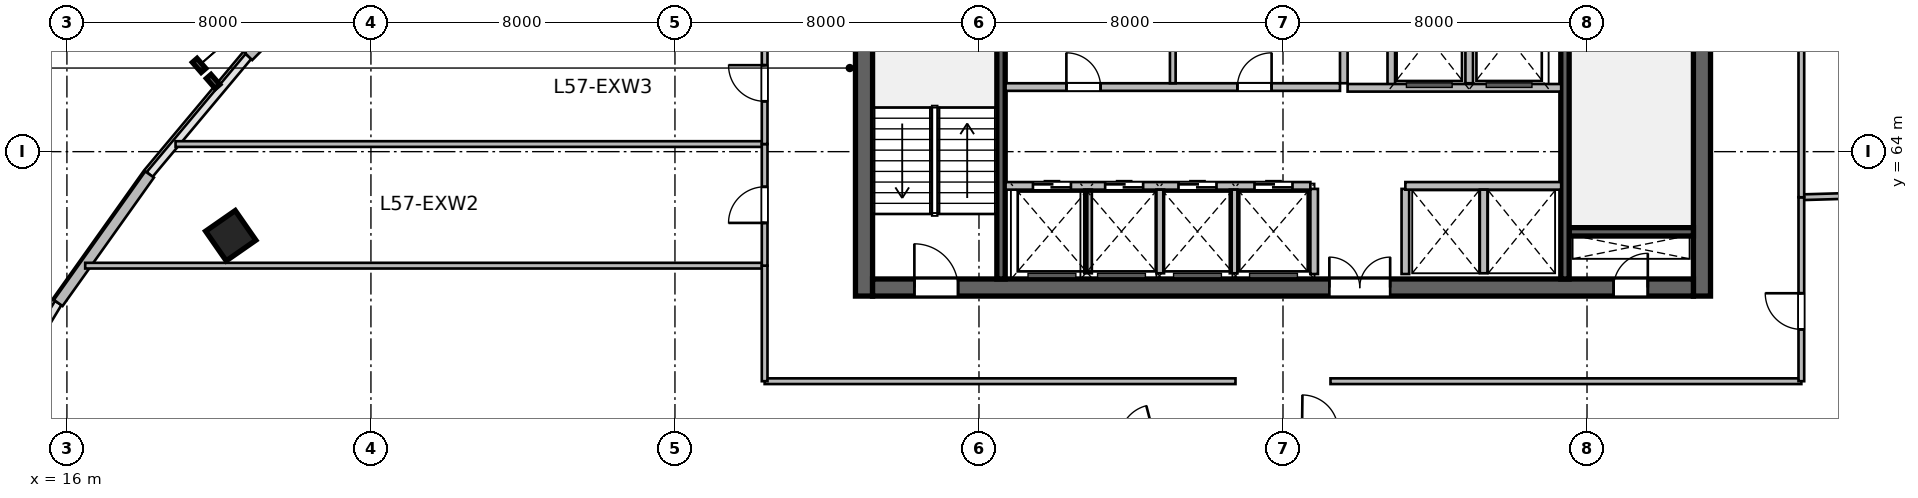
"""IFC4 building model, lengths in metres.
Left out: names, types, materials, properties, quantities, classifications, styles, units other than length and angle.
Written with IfcOpenShell. Run it as: python <this file> out.ifc"""

import sys

from ifc_helpers import new_model, si_unit, direction, frame, frame_2d, origin, origin_2d, place, context, subcontext, project, spatial, rectangle, extrude, source, transform, mapped, element, fill, save


model = new_model("IFC4")
c1 = context("Model", 3, precision=1e-05, world=origin(), true_north=direction((0.0, 1.0)))
c2 = subcontext(c1, "Body", "Model", "MODEL_VIEW")
j1 = project(units=[si_unit("LENGTHUNIT", "METRE"), si_unit("PLANEANGLEUNIT", "RADIAN")], contexts=[c1])
p1 = place(None, origin())
s1 = spatial("IfcSite", under=j1, at=p1, CompositionType="ELEMENT")
p2 = place(p1, origin())
s2 = spatial("IfcBuilding", under=s1, at=p2, CompositionType="ELEMENT")
p3 = place(p2, frame((0.0, 0.0, 235.2)))
s3 = spatial("IfcBuildingStorey", under=s2, at=p3, CompositionType="ELEMENT", Elevation=235.2)
m1 = source(origin(), c2, "Body", "SweptSolid", [
    extrude(rectangle(XDim=12.0, YDim=0.45, at=frame_2d((6.0, 0.0))), origin(), (0.0, 0.0, 1.0), 3.9),
])
for number, where, z_axis, x_axis in (
    (1, (36.975, 60.2, 0.0), (0.0, 0.0, 1.0), (0.0, 1.0, 0.0)),
    (2, (59.025, 60.2, 0.0), (0.0, 0.0, 1.0), (0.0, 1.0, 0.0)),
):
    element("IfcWall", number, at=place(p3, frame(where, z_axis=z_axis, x_axis=x_axis)), inside=s3, PredefinedType="SHEAR", context=c2, shape_type="MappedRepresentation", body=[
        mapped(m1, transform((0.0, 0.0, 0.0), scale=1.0)),
    ])
m2 = source(origin(), c2, "Body", "SweptSolid", [
    extrude(rectangle(XDim=21.6, YDim=0.45, at=frame_2d((10.8, 0.0))), origin(), (0.0, 0.0, 1.0), 3.9),
])
p4 = place(p3, frame((37.2, 60.425, 0.0), z_axis=(0.0, 0.0, 1.0), x_axis=(1.0, 0.0, 0.0)))
e3 = element("IfcWall", 3, at=p4, inside=s3, PredefinedType="SHEAR", context=c2, shape_type="MappedRepresentation", body=[
    mapped(m2, transform((0.0, 0.0, 0.0), scale=1.0)),
])
p5 = place(p4, frame((1.1, 0.0, 0.0)))
e4 = element("IfcOpeningElement", 4, at=p5, cuts=e3, PredefinedType="OPENING", context=c2, shape_type="SweptSolid", body=[
    extrude(rectangle(XDim=1.15, YDim=2.15, at=frame_2d((0.575, 1.075))), frame((0.0, 0.235, 0.0), z_axis=(0.0, -1.0, 0.0), x_axis=(1.0, 0.0, 0.0)), (0.0, 0.0, 1.0), 0.47),
])
p6 = place(p4, frame((19.5, 0.0, 0.0)))
e5 = element("IfcOpeningElement", 5, at=p6, cuts=e3, PredefinedType="OPENING", context=c2, shape_type="SweptSolid", body=[
    extrude(rectangle(XDim=0.9, YDim=2.1, at=frame_2d((0.45, 1.05))), frame((0.0, 0.235, 0.0), z_axis=(0.0, -1.0, 0.0), x_axis=(1.0, 0.0, 0.0)), (0.0, 0.0, 1.0), 0.47),
])
p7 = place(p4, frame((12.02, 0.0, 0.0)))
e6 = element("IfcOpeningElement", 6, at=p7, cuts=e3, PredefinedType="OPENING", context=c2, shape_type="SweptSolid", body=[
    extrude(rectangle(XDim=1.6, YDim=2.15, at=frame_2d((0.8, 1.075))), frame((0.0, 0.235, 0.0), z_axis=(0.0, -1.0, 0.0), x_axis=(1.0, 0.0, 0.0)), (0.0, 0.0, 1.0), 0.47),
])
m3 = source(origin(), c2, "Body", "SweptSolid", [
    extrude(rectangle(XDim=3.27, YDim=0.22, at=frame_2d((1.635, 0.0))), origin(), (0.0, 0.0, 1.0), 3.9),
])
p8 = place(p3, frame((55.53, 61.89, 0.0), z_axis=(0.0, 0.0, 1.0), x_axis=(1.0, 0.0, 0.0)))
e7 = element("IfcWall", 7, at=p8, inside=s3, PredefinedType="SHEAR", context=c2, shape_type="MappedRepresentation", body=[
    mapped(m3, transform((0.0, 0.0, 0.0), scale=1.0)),
])
m4 = source(origin(), c2, "Body", "SweptSolid", [
    extrude(rectangle(XDim=11.1, YDim=0.22, at=frame_2d((5.55, 0.0))), origin(), (0.0, 0.0, 1.0), 3.9),
])
p9 = place(p3, frame((40.58, 60.65, 0.0), z_axis=(0.0, 0.0, 1.0), x_axis=(0.0, 1.0, 0.0)))
e8 = element("IfcWall", 8, at=p9, inside=s3, PredefinedType="SHEAR", context=c2, shape_type="MappedRepresentation", body=[
    mapped(m4, transform((0.0, 0.0, 0.0), scale=1.0)),
])
p10 = place(p3, frame((55.42, 60.65, 0.0), z_axis=(0.0, 0.0, 1.0), x_axis=(0.0, 1.0, 0.0)))
e9 = element("IfcWall", 9, at=p10, inside=s3, PredefinedType="SHEAR", context=c2, shape_type="MappedRepresentation", body=[
    mapped(m4, transform((0.0, 0.0, 0.0), scale=1.0)),
])
p11 = place(p10, frame((9.595, 0.0, 0.0)))
e10 = element("IfcOpeningElement", 10, at=p11, cuts=e9, PredefinedType="OPENING", context=c2, shape_type="SweptSolid", body=[
    extrude(rectangle(XDim=1.15, YDim=2.15, at=frame_2d((0.575, 1.075))), frame((0.0, 0.12, 0.0), z_axis=(0.0, -1.0, 0.0), x_axis=(1.0, 0.0, 0.0)), (0.0, 0.0, 1.0), 0.24),
])
m5 = source(origin(), c2, "Body", "SweptSolid", [
    extrude(rectangle(XDim=0.95, YDim=0.95, at=origin_2d()), origin(), (0.0, 0.0, 1.0), 3.9),
])
p12 = place(p3, frame((20.311, 61.789, 0.0), z_axis=(0.0, 0.0, 1.0), x_axis=(-0.571143442153, 0.820850271661, 0.0)))
e11 = element("IfcColumn", 11, at=p12, inside=s3, PredefinedType="COLUMN", context=c2, shape_type="MappedRepresentation", body=[
    mapped(m5, transform((0.0, 0.0, 0.0), scale=1.0)),
])
m6 = source(origin(), c2, "Body", "SweptSolid", [
    extrude(rectangle(XDim=4.149, YDim=0.28, at=frame_2d((2.074, 0.0))), origin(), (0.0, 0.0, 1.0), 3.65),
])
p13 = place(p3, frame((15.771, 60.019, 0.0), z_axis=(0.0, 0.0, 1.0), x_axis=(0.579622789827, 0.814884913048, 0.0)))
e12 = element("IfcWall", 12, at=p13, inside=s3, PredefinedType="SOLIDWALL", context=c2, shape_type="MappedRepresentation", body=[
    mapped(m6, transform((0.0, 0.0, 0.0), scale=1.0)),
])
m7 = source(origin(), c2, "Body", "SweptSolid", [
    extrude(rectangle(XDim=3.955, YDim=0.28, at=frame_2d((1.978, 0.0))), origin(), (0.0, 0.0, 1.0), 3.65),
])
p14 = place(p3, frame((20.776, 66.507, 0.0), z_axis=(0.0, 0.0, 1.0), x_axis=(0.702710517474, 0.711475880569, 0.0)))
e13 = element("IfcWall", 13, at=p14, inside=s3, PredefinedType="SOLIDWALL", context=c2, shape_type="MappedRepresentation", body=[
    mapped(m7, transform((0.0, 0.0, 0.0), scale=1.0)),
])
m8 = source(origin(), c2, "Body", "SweptSolid", [
    extrude(rectangle(XDim=2.24, YDim=0.2, at=frame_2d((1.12, 0.0))), origin(), (0.0, 0.0, 1.0), 3.65),
])
for number, where, z_axis, x_axis in (
    (14, (48.82, 60.78, 0.0), (0.0, 0.0, 1.0), (0.0, 1.0, 0.0)),
    (15, (51.22, 60.78, 0.0), (0.0, 0.0, 1.0), (0.0, 1.0, 0.0)),
):
    element("IfcWall", number, at=place(p3, frame(where, z_axis=z_axis, x_axis=x_axis)), inside=s3, PredefinedType="SOLIDWALL", context=c2, shape_type="MappedRepresentation", body=[
        mapped(m8, transform((0.0, 0.0, 0.0), scale=1.0)),
    ])
m9 = source(origin(), c2, "Body", "SweptSolid", [
    extrude(rectangle(XDim=5.8, YDim=0.2, at=frame_2d((2.9, 0.0))), origin(), (0.0, 0.0, 1.0), 3.65),
])
p15 = place(p3, frame((49.6, 65.8, 0.0), z_axis=(0.0, 0.0, 1.0), x_axis=(0.0, 1.0, 0.0)))
e16 = element("IfcWall", 16, at=p15, inside=s3, PredefinedType="SOLIDWALL", context=c2, shape_type="MappedRepresentation", body=[
    mapped(m9, transform((0.0, 0.0, 0.0), scale=1.0)),
])
m10 = source(origin(), c2, "Body", "SweptSolid", [
    extrude(rectangle(XDim=2.58, YDim=0.2, at=frame_2d((1.29, 0.0))), origin(), (0.0, 0.0, 1.0), 3.65),
])
p16 = place(p3, frame((50.85, 65.68, 0.0), z_axis=(0.0, 0.0, 1.0), x_axis=(0.0, 1.0, 0.0)))
e17 = element("IfcWall", 17, at=p16, inside=s3, PredefinedType="SOLIDWALL", context=c2, shape_type="MappedRepresentation", body=[
    mapped(m10, transform((0.0, 0.0, 0.0), scale=1.0)),
])
m11 = source(origin(), c2, "Body", "SweptSolid", [
    extrude(rectangle(XDim=2.4, YDim=0.2, at=frame_2d((1.2, 0.0))), origin(), (0.0, 0.0, 1.0), 3.65),
])
p17 = place(p3, frame((52.9, 65.8, 0.0), z_axis=(0.0, 0.0, 1.0), x_axis=(0.0, 1.0, 0.0)))
e18 = element("IfcWall", 18, at=p17, inside=s3, PredefinedType="SOLIDWALL", context=c2, shape_type="MappedRepresentation", body=[
    mapped(m11, transform((0.0, 0.0, 0.0), scale=1.0)),
])
m12 = source(origin(), c2, "Body", "SweptSolid", [
    extrude(rectangle(XDim=5.62, YDim=0.2, at=frame_2d((2.81, 0.0))), origin(), (0.0, 0.0, 1.0), 3.65),
])
p18 = place(p3, frame((49.7, 65.68, 0.0), z_axis=(0.0, 0.0, 1.0), x_axis=(1.0, 0.0, 0.0)))
e19 = element("IfcWall", 19, at=p18, inside=s3, PredefinedType="SOLIDWALL", context=c2, shape_type="MappedRepresentation", body=[
    mapped(m12, transform((0.0, 0.0, 0.0), scale=1.0)),
])
m13 = source(origin(), c2, "Body", "SweptSolid", [
    extrude(rectangle(XDim=8.02, YDim=0.2, at=frame_2d((4.01, 0.0))), origin(), (0.0, 0.0, 1.0), 3.65),
])
p19 = place(p3, frame((40.7, 63.1, 0.0), z_axis=(0.0, 0.0, 1.0), x_axis=(1.0, 0.0, 0.0)))
e20 = element("IfcWall", 20, at=p19, inside=s3, PredefinedType="SOLIDWALL", context=c2, shape_type="MappedRepresentation", body=[
    mapped(m13, transform((0.0, 0.0, 0.0), scale=1.0)),
])
p20 = place(p19, frame((0.72, 0.0, 0.0)))
e21 = element("IfcOpeningElement", 21, at=p20, cuts=e20, PredefinedType="OPENING", context=c2, shape_type="SweptSolid", body=[
    extrude(rectangle(XDim=1.0, YDim=2.15, at=frame_2d((0.5, 1.075))), frame((0.0, 0.11, 0.0), z_axis=(0.0, -1.0, 0.0), x_axis=(1.0, 0.0, 0.0)), (0.0, 0.0, 1.0), 0.22),
])
p21 = place(p19, frame((2.62, 0.0, 0.0)))
e22 = element("IfcOpeningElement", 22, at=p21, cuts=e20, PredefinedType="OPENING", context=c2, shape_type="SweptSolid", body=[
    extrude(rectangle(XDim=1.0, YDim=2.15, at=frame_2d((0.5, 1.075))), frame((0.0, 0.11, 0.0), z_axis=(0.0, -1.0, 0.0), x_axis=(1.0, 0.0, 0.0)), (0.0, 0.0, 1.0), 0.22),
])
p22 = place(p19, frame((4.55, 0.0, 0.0)))
e23 = element("IfcOpeningElement", 23, at=p22, cuts=e20, PredefinedType="OPENING", context=c2, shape_type="SweptSolid", body=[
    extrude(rectangle(XDim=1.0, YDim=2.15, at=frame_2d((0.5, 1.075))), frame((0.0, 0.11, 0.0), z_axis=(0.0, -1.0, 0.0), x_axis=(1.0, 0.0, 0.0)), (0.0, 0.0, 1.0), 0.22),
])
p23 = place(p19, frame((6.55, 0.0, 0.0)))
e24 = element("IfcOpeningElement", 24, at=p23, cuts=e20, PredefinedType="OPENING", context=c2, shape_type="SweptSolid", body=[
    extrude(rectangle(XDim=1.0, YDim=2.15, at=frame_2d((0.5, 1.075))), frame((0.0, 0.11, 0.0), z_axis=(0.0, -1.0, 0.0), x_axis=(1.0, 0.0, 0.0)), (0.0, 0.0, 1.0), 0.22),
])
m14 = source(origin(), c2, "Body", "SweptSolid", [
    extrude(rectangle(XDim=4.1, YDim=0.2, at=frame_2d((2.05, 0.0))), origin(), (0.0, 0.0, 1.0), 3.65),
])
p24 = place(p3, frame((51.22, 63.1, 0.0), z_axis=(0.0, 0.0, 1.0), x_axis=(1.0, 0.0, 0.0)))
e25 = element("IfcWall", 25, at=p24, inside=s3, PredefinedType="SOLIDWALL", context=c2, shape_type="MappedRepresentation", body=[
    mapped(m14, transform((0.0, 0.0, 0.0), scale=1.0)),
])
m15 = source(origin(), c2, "Body", "SweptSolid", [
    extrude(rectangle(XDim=2.2, YDim=0.2, at=frame_2d((1.1, 0.0))), origin(), (0.0, 0.0, 1.0), 3.65),
])
for number, where, z_axis, x_axis in (
    (26, (42.87, 60.8, 0.0), (0.0, 0.0, 1.0), (0.0, 1.0, 0.0)),
    (27, (44.77, 60.8, 0.0), (0.0, 0.0, 1.0), (0.0, 1.0, 0.0)),
    (28, (46.7, 60.8, 0.0), (0.0, 0.0, 1.0), (0.0, 1.0, 0.0)),
    (29, (53.28, 60.8, 0.0), (0.0, 0.0, 1.0), (0.0, 1.0, 0.0)),
):
    element("IfcWall", number, at=place(p3, frame(where, z_axis=z_axis, x_axis=x_axis)), inside=s3, PredefinedType="SOLIDWALL", context=c2, shape_type="MappedRepresentation", body=[
        mapped(m15, transform((0.0, 0.0, 0.0), scale=1.0)),
    ])
m16 = source(origin(), c2, "Body", "SweptSolid", [
    extrude(rectangle(XDim=8.8, YDim=0.2, at=frame_2d((4.4, 0.0))), origin(), (0.0, 0.0, 1.0), 3.65),
])
p25 = place(p3, frame((40.7, 65.7, 0.0), z_axis=(0.0, 0.0, 1.0), x_axis=(1.0, 0.0, 0.0)))
e30 = element("IfcWall", 30, at=p25, inside=s3, PredefinedType="SOLIDWALL", context=c2, shape_type="MappedRepresentation", body=[
    mapped(m16, transform((0.0, 0.0, 0.0), scale=1.0)),
])
p26 = place(p25, frame((1.6, 0.0, 0.0)))
e31 = element("IfcOpeningElement", 31, at=p26, cuts=e30, PredefinedType="OPENING", context=c2, shape_type="SweptSolid", body=[
    extrude(rectangle(XDim=0.9, YDim=2.1, at=frame_2d((0.45, 1.05))), frame((0.0, 0.11, 0.0), z_axis=(0.0, -1.0, 0.0), x_axis=(1.0, 0.0, 0.0)), (0.0, 0.0, 1.0), 0.22),
])
p27 = place(p25, frame((6.1, 0.0, 0.0)))
e32 = element("IfcOpeningElement", 32, at=p27, cuts=e30, PredefinedType="OPENING", context=c2, shape_type="SweptSolid", body=[
    extrude(rectangle(XDim=0.9, YDim=2.1, at=frame_2d((0.45, 1.05))), frame((0.0, 0.11, 0.0), z_axis=(0.0, -1.0, 0.0), x_axis=(1.0, 0.0, 0.0)), (0.0, 0.0, 1.0), 0.22),
])
m17 = source(origin(), c2, "Body", "SweptSolid", [
    extrude(rectangle(XDim=2.4, YDim=0.15, at=frame_2d((1.2, 0.0))), origin(), (0.0, 0.0, 1.0), 3.65),
])
p28 = place(p3, frame((45.1, 65.8, 0.0), z_axis=(0.0, 0.0, 1.0), x_axis=(0.0, 1.0, 0.0)))
e33 = element("IfcWall", 33, at=p28, inside=s3, PredefinedType="PARTITIONING", context=c2, shape_type="MappedRepresentation", body=[
    mapped(m17, transform((0.0, 0.0, 0.0), scale=1.0)),
])
m18 = source(origin(), c2, "Body", "SweptSolid", [
    extrude(rectangle(XDim=12.39, YDim=0.15, at=frame_2d((6.195, 0.0))), origin(), (0.0, 0.0, 1.0), 3.65),
])
for number, where, z_axis, x_axis in (
    (34, (34.36, 57.96, 0.0), (0.0, 0.0, 1.0), (1.0, 0.0, 0.0)),
    (35, (49.25, 57.96, 0.0), (0.0, 0.0, 1.0), (1.0, 0.0, 0.0)),
):
    element("IfcWall", number, at=place(p3, frame(where, z_axis=z_axis, x_axis=x_axis)), inside=s3, PredefinedType="PARTITIONING", context=c2, shape_type="MappedRepresentation", body=[
        mapped(m18, transform((0.0, 0.0, 0.0), scale=1.0)),
    ])
m19 = source(origin(), c2, "Body", "SweptSolid", [
    extrude(rectangle(XDim=17.879, YDim=0.15, at=frame_2d((8.939, 0.0))), origin(), (0.0, 0.0, 1.0), 3.65),
])
p29 = place(p3, frame((16.481, 61.0, 0.0), z_axis=(0.0, 0.0, 1.0), x_axis=(1.0, 0.0, 0.0)))
e36 = element("IfcWall", 36, at=p29, inside=s3, PredefinedType="PARTITIONING", context=c2, shape_type="MappedRepresentation", body=[
    mapped(m19, transform((0.0, 0.0, 0.0), scale=1.0)),
])
m20 = source(origin(), c2, "Body", "SweptSolid", [
    extrude(rectangle(XDim=3.04, YDim=0.15, at=frame_2d((1.52, 0.0))), origin(), (0.0, 0.0, 1.0), 3.65),
])
p30 = place(p3, frame((34.36, 57.96, 0.0), z_axis=(0.0, 0.0, 1.0), x_axis=(0.0, 1.0, 0.0)))
e37 = element("IfcWall", 37, at=p30, inside=s3, PredefinedType="PARTITIONING", context=c2, shape_type="MappedRepresentation", body=[
    mapped(m20, transform((0.0, 0.0, 0.0), scale=1.0)),
])
m21 = source(origin(), c2, "Body", "SweptSolid", [
    extrude(rectangle(XDim=15.501, YDim=0.15, at=frame_2d((7.751, 0.0))), origin(), (0.0, 0.0, 1.0), 3.65),
])
p31 = place(p3, frame((18.859, 64.2, 0.0), z_axis=(0.0, 0.0, 1.0), x_axis=(1.0, 0.0, 0.0)))
e38 = element("IfcWall", 38, at=p31, inside=s3, PredefinedType="PARTITIONING", context=c2, shape_type="MappedRepresentation", body=[
    mapped(m21, transform((0.0, 0.0, 0.0), scale=1.0)),
])
m22 = source(origin(), c2, "Body", "SweptSolid", [
    extrude(rectangle(XDim=3.2, YDim=0.15, at=frame_2d((1.6, 0.0))), origin(), (0.0, 0.0, 1.0), 3.65),
])
p32 = place(p3, frame((34.36, 61.0, 0.0), z_axis=(0.0, 0.0, 1.0), x_axis=(0.0, 1.0, 0.0)))
e39 = element("IfcWall", 39, at=p32, inside=s3, PredefinedType="PARTITIONING", context=c2, shape_type="MappedRepresentation", body=[
    mapped(m22, transform((0.0, 0.0, 0.0), scale=1.0)),
])
p33 = place(p32, frame((1.125, 0.0, 0.0)))
e40 = element("IfcOpeningElement", 40, at=p33, cuts=e39, PredefinedType="OPENING", context=c2, shape_type="SweptSolid", body=[
    extrude(rectangle(XDim=0.95, YDim=2.1, at=frame_2d((0.475, 1.05))), frame((0.0, 0.085, 0.0), z_axis=(0.0, -1.0, 0.0), x_axis=(1.0, 0.0, 0.0)), (0.0, 0.0, 1.0), 0.17),
])
p34 = place(p3, frame((34.36, 64.2, 0.0), z_axis=(0.0, 0.0, 1.0), x_axis=(0.0, 1.0, 0.0)))
e41 = element("IfcWall", 41, at=p34, inside=s3, PredefinedType="PARTITIONING", context=c2, shape_type="MappedRepresentation", body=[
    mapped(m22, transform((0.0, 0.0, 0.0), scale=1.0)),
])
p35 = place(p34, frame((1.125, 0.0, 0.0)))
e42 = element("IfcOpeningElement", 42, at=p35, cuts=e41, PredefinedType="OPENING", context=c2, shape_type="SweptSolid", body=[
    extrude(rectangle(XDim=0.95, YDim=2.1, at=frame_2d((0.475, 1.05))), frame((0.0, 0.085, 0.0), z_axis=(0.0, -1.0, 0.0), x_axis=(1.0, 0.0, 0.0)), (0.0, 0.0, 1.0), 0.17),
])
m23 = source(origin(), c2, "Body", "SweptSolid", [
    extrude(rectangle(XDim=13.315, YDim=0.15, at=frame_2d((6.657, 0.0))), origin(), (0.0, 0.0, 1.0), 3.65),
])
p36 = place(p3, frame((61.64, 62.8, 0.0), z_axis=(0.0, 0.0, 1.0), x_axis=(0.999574400598, 0.029172207124, 0.0)))
e43 = element("IfcWall", 43, at=p36, inside=s3, PredefinedType="PARTITIONING", context=c2, shape_type="MappedRepresentation", body=[
    mapped(m23, transform((0.0, 0.0, 0.0), scale=1.0)),
])
m24 = source(origin(), c2, "Body", "SweptSolid", [
    extrude(rectangle(XDim=4.84, YDim=0.15, at=frame_2d((2.42, 0.0))), origin(), (0.0, 0.0, 1.0), 3.65),
])
p37 = place(p3, frame((61.64, 57.96, 0.0), z_axis=(0.0, 0.0, 1.0), x_axis=(0.0, 1.0, 0.0)))
e44 = element("IfcWall", 44, at=p37, inside=s3, PredefinedType="PARTITIONING", context=c2, shape_type="MappedRepresentation", body=[
    mapped(m24, transform((0.0, 0.0, 0.0), scale=1.0)),
])
p38 = place(p37, frame((1.364, 0.0, 0.0)))
e45 = element("IfcOpeningElement", 45, at=p38, cuts=e44, PredefinedType="OPENING", context=c2, shape_type="SweptSolid", body=[
    extrude(rectangle(XDim=0.95, YDim=2.1, at=frame_2d((0.475, 1.05))), frame((0.0, 0.085, 0.0), z_axis=(0.0, -1.0, 0.0), x_axis=(1.0, 0.0, 0.0)), (0.0, 0.0, 1.0), 0.17),
])
m25 = source(origin(), c2, "Body", "SweptSolid", [
    extrude(rectangle(XDim=13.727, YDim=0.15, at=frame_2d((6.864, 0.0))), origin(), (0.0, 0.0, 1.0), 3.65),
])
p39 = place(p3, frame((61.64, 62.8, 0.0), z_axis=(0.0, 0.0, 1.0), x_axis=(0.0, 1.0, 0.0)))
e46 = element("IfcWall", 46, at=p39, inside=s3, PredefinedType="PARTITIONING", context=c2, shape_type="MappedRepresentation", body=[
    mapped(m25, transform((0.0, 0.0, 0.0), scale=1.0)),
])
p40 = place(p39, frame((4.741, 0.0, 0.0)))
e47 = element("IfcOpeningElement", 47, at=p40, cuts=e46, PredefinedType="OPENING", context=c2, shape_type="SweptSolid", body=[
    extrude(rectangle(XDim=0.95, YDim=2.1, at=frame_2d((0.475, 1.05))), frame((0.0, 0.085, 0.0), z_axis=(0.0, -1.0, 0.0), x_axis=(1.0, 0.0, 0.0)), (0.0, 0.0, 1.0), 0.17),
])
m26 = source(origin(), c2, "Body", "SweptSolid", [
    extrude(rectangle(XDim=1.15, YDim=2.15, at=frame_2d((0.575, 1.075))), frame((0.0, 0.025, 0.0), z_axis=(0.0, -1.0, 0.0), x_axis=(1.0, 0.0, 0.0)), (0.0, 0.0, 1.0), 0.05),
])
p41 = place(p5, origin())
e48 = element("IfcDoor", 48, at=p41, inside=s3, OperationType="SINGLE_SWING_LEFT", PredefinedType="DOOR", context=c2, shape_type="MappedRepresentation", body=[
    mapped(m26, transform((0.0, 0.0, 0.0), scale=1.0)),
])
fill(e4, e48)
m27 = source(origin(), c2, "Body", "SweptSolid", [
    extrude(rectangle(XDim=0.9, YDim=2.1, at=frame_2d((0.45, 1.05))), frame((0.0, 0.025, 0.0), z_axis=(0.0, -1.0, 0.0), x_axis=(1.0, 0.0, 0.0)), (0.0, 0.0, 1.0), 0.05),
])
p42 = place(p6, origin())
e49 = element("IfcDoor", 49, at=p42, inside=s3, OperationType="SINGLE_SWING_RIGHT", PredefinedType="DOOR", context=c2, shape_type="MappedRepresentation", body=[
    mapped(m27, transform((0.0, 0.0, 0.0), scale=1.0)),
])
fill(e5, e49)
m28 = source(origin(), c2, "Body", "SweptSolid", [
    extrude(rectangle(XDim=1.6, YDim=2.15, at=frame_2d((0.8, 1.075))), frame((0.0, 0.025, 0.0), z_axis=(0.0, -1.0, 0.0), x_axis=(1.0, 0.0, 0.0)), (0.0, 0.0, 1.0), 0.05),
])
p43 = place(p7, origin())
e50 = element("IfcDoor", 50, at=p43, inside=s3, OperationType="DOUBLE_DOOR_SINGLE_SWING", PredefinedType="DOOR", context=c2, shape_type="MappedRepresentation", body=[
    mapped(m28, transform((0.0, 0.0, 0.0), scale=1.0)),
])
fill(e6, e50)
m29 = source(origin(), c2, "Body", "SweptSolid", [
    extrude(rectangle(XDim=1.0, YDim=2.15, at=frame_2d((0.5, 1.075))), frame((0.0, 0.025, 0.0), z_axis=(0.0, -1.0, 0.0), x_axis=(1.0, 0.0, 0.0)), (0.0, 0.0, 1.0), 0.05),
])
p44 = place(p20, origin())
e51 = element("IfcDoor", 51, at=p44, inside=s3, OperationType="DOUBLE_DOOR_SLIDING", PredefinedType="DOOR", context=c2, shape_type="MappedRepresentation", body=[
    mapped(m29, transform((0.0, 0.0, 0.0), scale=1.0)),
])
fill(e21, e51)
p45 = place(p21, origin())
e52 = element("IfcDoor", 52, at=p45, inside=s3, OperationType="DOUBLE_DOOR_SLIDING", PredefinedType="DOOR", context=c2, shape_type="MappedRepresentation", body=[
    mapped(m29, transform((0.0, 0.0, 0.0), scale=1.0)),
])
fill(e22, e52)
p46 = place(p22, origin())
e53 = element("IfcDoor", 53, at=p46, inside=s3, OperationType="DOUBLE_DOOR_SLIDING", PredefinedType="DOOR", context=c2, shape_type="MappedRepresentation", body=[
    mapped(m29, transform((0.0, 0.0, 0.0), scale=1.0)),
])
fill(e23, e53)
p47 = place(p23, origin())
e54 = element("IfcDoor", 54, at=p47, inside=s3, OperationType="DOUBLE_DOOR_SLIDING", PredefinedType="DOOR", context=c2, shape_type="MappedRepresentation", body=[
    mapped(m29, transform((0.0, 0.0, 0.0), scale=1.0)),
])
fill(e24, e54)
p48 = place(p26, origin())
e55 = element("IfcDoor", 55, at=p48, inside=s3, OperationType="SINGLE_SWING_LEFT", PredefinedType="DOOR", context=c2, shape_type="MappedRepresentation", body=[
    mapped(m27, transform((0.0, 0.0, 0.0), scale=1.0)),
])
fill(e31, e55)
p49 = place(p27, origin())
e56 = element("IfcDoor", 56, at=p49, inside=s3, OperationType="SINGLE_SWING_RIGHT", PredefinedType="DOOR", context=c2, shape_type="MappedRepresentation", body=[
    mapped(m27, transform((0.0, 0.0, 0.0), scale=1.0)),
])
fill(e32, e56)
m30 = source(origin(), c2, "Body", "SweptSolid", [
    extrude(rectangle(XDim=0.95, YDim=2.1, at=frame_2d((0.475, 1.05))), frame((0.0, 0.025, 0.0), z_axis=(0.0, -1.0, 0.0), x_axis=(1.0, 0.0, 0.0)), (0.0, 0.0, 1.0), 0.05),
])
p50 = place(p33, origin())
e57 = element("IfcDoor", 57, at=p50, inside=s3, OperationType="SINGLE_SWING_LEFT", PredefinedType="DOOR", context=c2, shape_type="MappedRepresentation", body=[
    mapped(m30, transform((0.0, 0.0, 0.0), scale=1.0)),
])
fill(e40, e57)
p51 = place(p35, origin())
e58 = element("IfcDoor", 58, at=p51, inside=s3, OperationType="SINGLE_SWING_RIGHT", PredefinedType="DOOR", context=c2, shape_type="MappedRepresentation", body=[
    mapped(m30, transform((0.0, 0.0, 0.0), scale=1.0)),
])
fill(e42, e58)
p52 = place(p38, origin())
e59 = element("IfcDoor", 59, at=p52, inside=s3, OperationType="SINGLE_SWING_RIGHT", PredefinedType="DOOR", context=c2, shape_type="MappedRepresentation", body=[
    mapped(m30, transform((0.0, 0.0, 0.0), scale=1.0)),
])
fill(e45, e59)
save(model, sys.argv[1])
